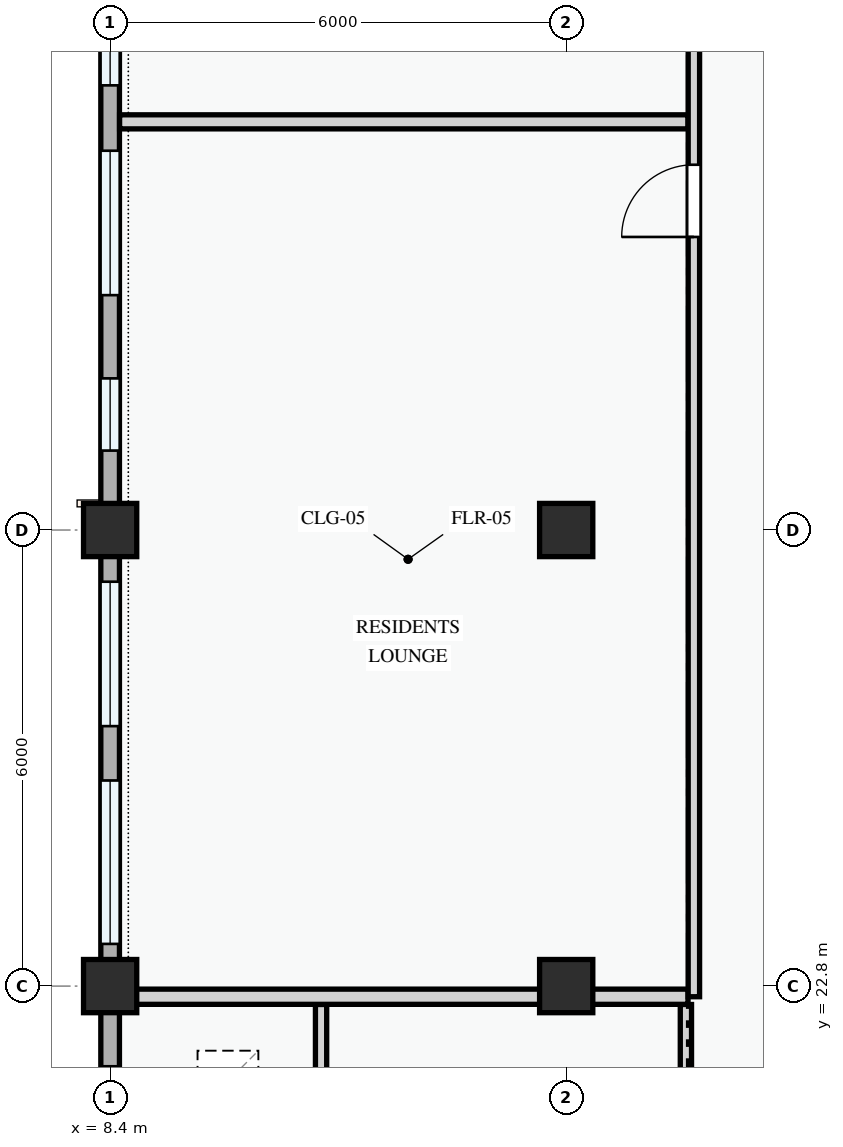
"""IFC4 building model, lengths in metres.
Left out: names, types, materials, properties, quantities, classifications, styles, units other than length and angle.
Written with IfcOpenShell. Run it as: python <this file> out.ifc"""

import sys

from ifc_helpers import new_model, si_unit, direction, frame, frame_2d, origin, origin_2d, place, context, subcontext, project, spatial, rectangle, extrude, element, fill, save


model = new_model("IFC4")
c1 = context("Model", 3, precision=1e-05, world=origin(), true_north=direction((0.0, 1.0)))
c2 = subcontext(c1, "Body", "Model", "MODEL_VIEW")
j1 = project(units=[si_unit("LENGTHUNIT", "METRE"), si_unit("PLANEANGLEUNIT", "RADIAN")], contexts=[c1])
p1 = place(None, origin())
s1 = spatial("IfcSite", under=j1, at=p1, CompositionType="ELEMENT")
p2 = place(p1, origin())
s2 = spatial("IfcBuilding", under=s1, at=p2, CompositionType="ELEMENT")
p3 = place(p2, origin())
s3 = spatial("IfcBuildingStorey", under=s2, at=p3, CompositionType="ELEMENT", Elevation=0.0)
for number, where, z_axis, x_axis in (
    (1, (8.4, 22.8, 0.0), (0.0, 0.0, 1.0), (1.0, 0.0, 0.0)),
    (2, (8.4, 28.8, 0.0), (0.0, 0.0, 1.0), (1.0, 0.0, 0.0)),
    (3, (14.4, 22.8, 0.0), (0.0, 0.0, 1.0), (1.0, 0.0, 0.0)),
    (4, (14.4, 28.8, 0.0), (0.0, 0.0, 1.0), (1.0, 0.0, 0.0)),
):
    element("IfcColumn", number, at=place(p3, frame(where, z_axis=z_axis, x_axis=x_axis)), inside=s3, PredefinedType="COLUMN", context=c2, shape_type="SweptSolid", body=[
        extrude(rectangle(XDim=0.7, YDim=0.7, at=origin_2d()), origin(), (0.0, 0.0, 1.0), 4.5),
    ])
p4 = place(p3, frame((8.4, 37.2, 0.0), z_axis=(0.0, 0.0, 1.0), x_axis=(0.0, -1.0, 0.0)))
e5 = element("IfcWall", 5, at=p4, inside=s3, PredefinedType="STANDARD", context=c2, shape_type="SweptSolid", body=[
    extrude(rectangle(XDim=8.4, YDim=0.245, at=frame_2d((4.2, 0.0))), origin(), (0.0, 0.0, 1.0), 3.485),
])
p5 = place(p4, frame((0.67, 0.0, 0.78)))
e6 = element("IfcOpeningElement", 6, at=p5, cuts=e5, PredefinedType="OPENING", context=c2, shape_type="SweptSolid", body=[
    extrude(rectangle(XDim=1.88, YDim=1.52, at=frame_2d((0.94, 0.76))), frame((0.0, 0.133, 0.0), z_axis=(0.0, -1.0, 0.0), x_axis=(1.0, 0.0, 0.0)), (0.0, 0.0, 1.0), 0.265),
])
p6 = place(p4, frame((3.41, 0.0, 0.78)))
e7 = element("IfcOpeningElement", 7, at=p6, cuts=e5, PredefinedType="OPENING", context=c2, shape_type="SweptSolid", body=[
    extrude(rectangle(XDim=1.9, YDim=1.55, at=frame_2d((0.95, 0.775))), frame((0.0, 0.133, 0.0), z_axis=(0.0, -1.0, 0.0), x_axis=(1.0, 0.0, 0.0)), (0.0, 0.0, 1.0), 0.265),
])
p7 = place(p4, frame((6.405, 0.0, 0.78)))
e8 = element("IfcOpeningElement", 8, at=p7, cuts=e5, PredefinedType="OPENING", context=c2, shape_type="SweptSolid", body=[
    extrude(rectangle(XDim=0.95, YDim=1.15, at=frame_2d((0.475, 0.575))), frame((0.0, 0.133, 0.0), z_axis=(0.0, -1.0, 0.0), x_axis=(1.0, 0.0, 0.0)), (0.0, 0.0, 1.0), 0.265),
])
p8 = place(p3, frame((8.4, 28.8, 0.0), z_axis=(0.0, 0.0, 1.0), x_axis=(0.0, -1.0, 0.0)))
e9 = element("IfcWall", 9, at=p8, inside=s3, PredefinedType="STANDARD", context=c2, shape_type="SweptSolid", body=[
    extrude(rectangle(XDim=6.0, YDim=0.245, at=frame_2d((3.0, 0.0))), origin(), (0.0, 0.0, 1.0), 3.585),
])
p9 = place(p8, frame((0.68, 0.0, 0.78)))
e10 = element("IfcOpeningElement", 10, at=p9, cuts=e9, PredefinedType="OPENING", context=c2, shape_type="SweptSolid", body=[
    extrude(rectangle(XDim=1.9, YDim=1.55, at=frame_2d((0.95, 0.775))), frame((0.0, 0.133, 0.0), z_axis=(0.0, -1.0, 0.0), x_axis=(1.0, 0.0, 0.0)), (0.0, 0.0, 1.0), 0.265),
])
p10 = place(p8, frame((3.295, 0.0, 0.78)))
e11 = element("IfcOpeningElement", 11, at=p10, cuts=e9, PredefinedType="OPENING", context=c2, shape_type="SweptSolid", body=[
    extrude(rectangle(XDim=2.15, YDim=1.65, at=frame_2d((1.075, 0.825))), frame((0.0, 0.133, 0.0), z_axis=(0.0, -1.0, 0.0), x_axis=(1.0, 0.0, 0.0)), (0.0, 0.0, 1.0), 0.265),
])
p11 = place(p3, frame((8.4, 22.8, 0.0), z_axis=(0.0, 0.0, 1.0), x_axis=(0.0, -1.0, 0.0)))
e12 = element("IfcWall", 12, at=p11, inside=s3, PredefinedType="STANDARD", context=c2, shape_type="SweptSolid", body=[
    extrude(rectangle(XDim=8.4, YDim=0.245, at=frame_2d((4.2, 0.0))), origin(), (0.0, 0.0, 1.0), 3.485),
])
p12 = place(p11, frame((1.055, 0.0, 0.78)))
e13 = element("IfcOpeningElement", 13, at=p12, cuts=e12, PredefinedType="OPENING", context=c2, shape_type="SweptSolid", body=[
    extrude(rectangle(XDim=2.28, YDim=1.46, at=frame_2d((1.14, 0.73))), frame((0.0, 0.133, 0.0), z_axis=(0.0, -1.0, 0.0), x_axis=(1.0, 0.0, 0.0)), (0.0, 0.0, 1.0), 0.265),
])
p13 = place(p11, frame((4.863, 0.0, 0.78)))
e14 = element("IfcOpeningElement", 14, at=p13, cuts=e12, PredefinedType="OPENING", context=c2, shape_type="SweptSolid", body=[
    extrude(rectangle(XDim=1.6, YDim=1.55, at=frame_2d((0.8, 0.775))), frame((0.0, 0.133, 0.0), z_axis=(0.0, -1.0, 0.0), x_axis=(1.0, 0.0, 0.0)), (0.0, 0.0, 1.0), 0.265),
])
for number, where, z_axis, x_axis in (
    (15, (11.175, 18.676, 0.0), (0.0, 0.0, 1.0), (0.0, 1.0, 0.0)),
    (16, (15.975, 18.676, 0.0), (0.0, 0.0, 1.0), (0.0, 1.0, 0.0)),
):
    element("IfcWall", number, at=place(p3, frame(where, z_axis=z_axis, x_axis=x_axis)), inside=s3, PredefinedType="PARTITIONING", context=c2, shape_type="SweptSolid", body=[
        extrude(rectangle(XDim=3.882, YDim=0.148, at=frame_2d((1.941, 0.0))), origin(), (0.0, 0.0, 1.0), 4.2),
    ])
p14 = place(p3, frame((8.524, 22.66, 0.0), z_axis=(0.0, 0.0, 1.0), x_axis=(1.0, 0.0, 0.0)))
e17 = element("IfcWall", 17, at=p14, inside=s3, PredefinedType="PARTITIONING", context=c2, shape_type="SweptSolid", body=[
    extrude(rectangle(XDim=7.479, YDim=0.2, at=frame_2d((3.739, 0.0))), origin(), (0.0, 0.0, 1.0), 3.485),
])
p15 = place(p3, frame((8.524, 34.17, 0.0), z_axis=(0.0, 0.0, 1.0), x_axis=(1.0, 0.0, 0.0)))
e18 = element("IfcWall", 18, at=p15, inside=s3, PredefinedType="PARTITIONING", context=c2, shape_type="SweptSolid", body=[
    extrude(rectangle(XDim=7.479, YDim=0.185, at=frame_2d((3.739, 0.0))), origin(), (0.0, 0.0, 1.0), 4.2),
])
p16 = place(p3, frame((16.08, 22.66, 0.0), z_axis=(0.0, 0.0, 1.0), x_axis=(0.0, 1.0, 0.0)))
e19 = element("IfcWall", 19, at=p16, inside=s3, PredefinedType="PARTITIONING", context=c2, shape_type="SweptSolid", body=[
    extrude(rectangle(XDim=34.816, YDim=0.15, at=frame_2d((17.408, 0.0))), origin(), (0.0, 0.0, 1.0), 4.2),
])
p17 = place(p16, frame((9.996, 0.0, 0.0)))
e20 = element("IfcOpeningElement", 20, at=p17, cuts=e19, PredefinedType="OPENING", context=c2, shape_type="SweptSolid", body=[
    extrude(rectangle(XDim=0.95, YDim=2.1, at=frame_2d((0.475, 1.05))), frame((0.0, 0.085, 0.0), z_axis=(0.0, -1.0, 0.0), x_axis=(1.0, 0.0, 0.0)), (0.0, 0.0, 1.0), 0.17),
])
p18 = place(p16, frame((16.965, 0.0, 0.0)))
e21 = element("IfcOpeningElement", 21, at=p18, cuts=e19, PredefinedType="OPENING", context=c2, shape_type="SweptSolid", body=[
    extrude(rectangle(XDim=0.95, YDim=2.1, at=frame_2d((0.475, 1.05))), frame((0.0, 0.085, 0.0), z_axis=(0.0, -1.0, 0.0), x_axis=(1.0, 0.0, 0.0)), (0.0, 0.0, 1.0), 0.17),
])
p19 = place(p16, frame((24.249, 0.0, 0.0)))
e22 = element("IfcOpeningElement", 22, at=p19, cuts=e19, PredefinedType="OPENING", context=c2, shape_type="SweptSolid", body=[
    extrude(rectangle(XDim=0.95, YDim=2.1, at=frame_2d((0.475, 1.05))), frame((0.0, 0.085, 0.0), z_axis=(0.0, -1.0, 0.0), x_axis=(1.0, 0.0, 0.0)), (0.0, 0.0, 1.0), 0.17),
])
p20 = place(p5, origin())
e23 = element("IfcWindow", 23, at=p20, inside=s3, PartitioningType="DOUBLE_PANEL_VERTICAL", PredefinedType="WINDOW", context=c2, shape_type="SweptSolid", body=[
    extrude(rectangle(XDim=1.88, YDim=1.52, at=frame_2d((0.94, 0.76))), frame((0.0, 0.03, 0.0), z_axis=(0.0, -1.0, 0.0), x_axis=(1.0, 0.0, 0.0)), (0.0, 0.0, 1.0), 0.06),
])
fill(e6, e23)
p21 = place(p6, origin())
e24 = element("IfcWindow", 24, at=p21, inside=s3, PartitioningType="DOUBLE_PANEL_VERTICAL", PredefinedType="WINDOW", context=c2, shape_type="SweptSolid", body=[
    extrude(rectangle(XDim=1.9, YDim=1.55, at=frame_2d((0.95, 0.775))), frame((0.0, 0.03, 0.0), z_axis=(0.0, -1.0, 0.0), x_axis=(1.0, 0.0, 0.0)), (0.0, 0.0, 1.0), 0.06),
])
fill(e7, e24)
p22 = place(p7, origin())
e25 = element("IfcWindow", 25, at=p22, inside=s3, PartitioningType="SINGLE_PANEL", PredefinedType="WINDOW", context=c2, shape_type="SweptSolid", body=[
    extrude(rectangle(XDim=0.95, YDim=1.15, at=frame_2d((0.475, 0.575))), frame((0.0, 0.03, 0.0), z_axis=(0.0, -1.0, 0.0), x_axis=(1.0, 0.0, 0.0)), (0.0, 0.0, 1.0), 0.06),
])
fill(e8, e25)
p23 = place(p9, origin())
e26 = element("IfcWindow", 26, at=p23, inside=s3, PartitioningType="DOUBLE_PANEL_VERTICAL", PredefinedType="WINDOW", context=c2, shape_type="SweptSolid", body=[
    extrude(rectangle(XDim=1.9, YDim=1.55, at=frame_2d((0.95, 0.775))), frame((0.0, 0.03, 0.0), z_axis=(0.0, -1.0, 0.0), x_axis=(1.0, 0.0, 0.0)), (0.0, 0.0, 1.0), 0.06),
])
fill(e10, e26)
p24 = place(p10, origin())
e27 = element("IfcWindow", 27, at=p24, inside=s3, PartitioningType="DOUBLE_PANEL_VERTICAL", PredefinedType="WINDOW", context=c2, shape_type="SweptSolid", body=[
    extrude(rectangle(XDim=2.15, YDim=1.65, at=frame_2d((1.075, 0.825))), frame((0.0, 0.03, 0.0), z_axis=(0.0, -1.0, 0.0), x_axis=(1.0, 0.0, 0.0)), (0.0, 0.0, 1.0), 0.06),
])
fill(e11, e27)
p25 = place(p12, origin())
e28 = element("IfcWindow", 28, at=p25, inside=s3, PartitioningType="DOUBLE_PANEL_VERTICAL", PredefinedType="WINDOW", context=c2, shape_type="SweptSolid", body=[
    extrude(rectangle(XDim=2.28, YDim=1.46, at=frame_2d((1.14, 0.73))), frame((0.0, 0.03, 0.0), z_axis=(0.0, -1.0, 0.0), x_axis=(1.0, 0.0, 0.0)), (0.0, 0.0, 1.0), 0.06),
])
fill(e13, e28)
p26 = place(p17, origin())
e29 = element("IfcDoor", 29, at=p26, inside=s3, OperationType="SINGLE_SWING_LEFT", PredefinedType="DOOR", context=c2, shape_type="SweptSolid", body=[
    extrude(rectangle(XDim=0.95, YDim=2.1, at=frame_2d((0.475, 1.05))), frame((0.0, 0.025, 0.0), z_axis=(0.0, -1.0, 0.0), x_axis=(1.0, 0.0, 0.0)), (0.0, 0.0, 1.0), 0.05),
])
fill(e20, e29)
save(model, sys.argv[1])
